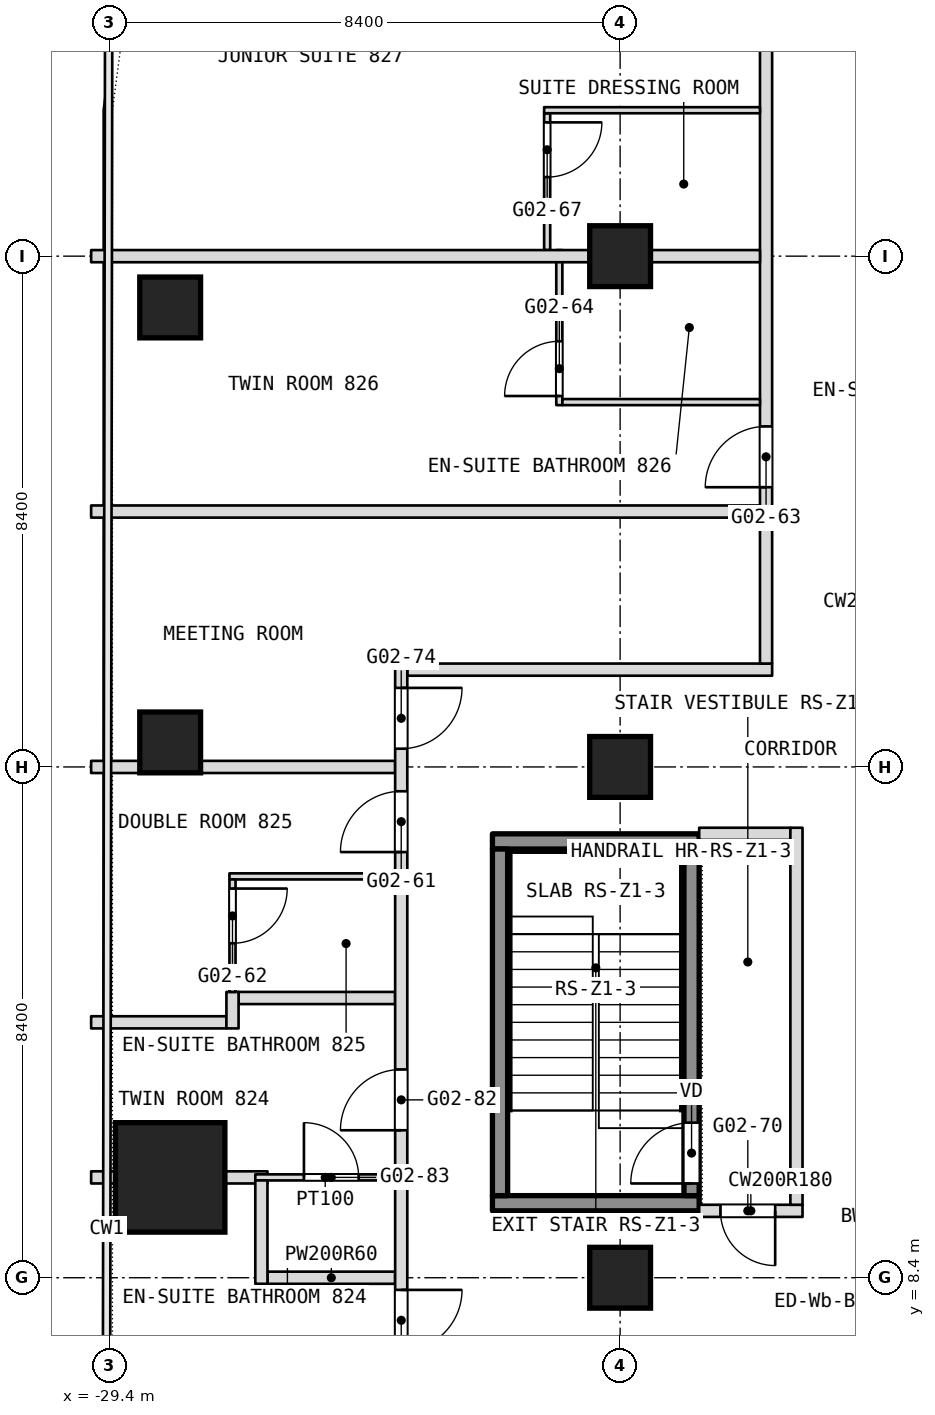
"""IFC4 building model, lengths in metres.
Left out: names, types, materials, properties, quantities, classifications, styles, units other than length and angle.
Written with IfcOpenShell. Run it as: python <this file> out.ifc"""

import sys

from ifc_helpers import new_model, si_unit, direction, frame, frame_2d, origin, origin_2d, place, context, subcontext, project, spatial, rectangle, extrude, element, fill, save


model = new_model("IFC4")
c1 = context("Model", 3, precision=1e-05, world=origin(), true_north=direction((0.0, 1.0)))
c2 = subcontext(c1, "Body", "Model", "MODEL_VIEW")
j1 = project(units=[si_unit("LENGTHUNIT", "METRE"), si_unit("PLANEANGLEUNIT", "RADIAN")], contexts=[c1])
p1 = place(None, origin())
s1 = spatial("IfcSite", under=j1, at=p1, CompositionType="ELEMENT")
p2 = place(p1, origin())
s2 = spatial("IfcBuilding", under=s1, at=p2, CompositionType="ELEMENT")
p3 = place(p2, frame((0.0, 0.0, 43.7)))
s3 = spatial("IfcBuildingStorey", under=s2, at=p3, CompositionType="ELEMENT", Elevation=43.7)
p4 = place(p3, frame((-28.4, 10.05, 0.0), z_axis=(0.0, 0.0, 1.0), x_axis=(1.0, 0.0, 0.0)))
e1 = element("IfcColumn", 1, at=p4, inside=s3, PredefinedType="COLUMN", context=c2, shape_type="SweptSolid", body=[
    extrude(rectangle(XDim=1.8, YDim=1.8, at=origin_2d()), origin(), (0.0, 0.0, 1.0), 3.6),
])
for number, where, z_axis, x_axis in (
    (2, (-21.0, 8.4, 0.0), (0.0, 0.0, 1.0), (1.0, 0.0, 0.0)),
    (3, (-21.0, 16.8, 0.0), (0.0, 0.0, 1.0), (1.0, 0.0, 0.0)),
    (4, (-21.0, 25.2, 0.0), (0.0, 0.0, 1.0), (1.0, 0.0, 0.0)),
    (5, (-28.4, 17.203, 0.0), (0.0, 0.0, 1.0), (1.0, 0.0, 0.0)),
    (6, (-28.4, 24.356, 0.0), (0.0, 0.0, 1.0), (1.0, 0.0, 0.0)),
):
    element("IfcColumn", number, at=place(p3, frame(where, z_axis=z_axis, x_axis=x_axis)), inside=s3, PredefinedType="COLUMN", context=c2, shape_type="SweptSolid", body=[
        extrude(rectangle(XDim=1.0, YDim=1.0, at=origin_2d()), origin(), (0.0, 0.0, 1.0), 3.6),
    ])
p5 = place(p3, frame((-26.8, 8.4, 0.0), z_axis=(0.0, 0.0, 1.0), x_axis=(1.0, 0.0, 0.0)))
e7 = element("IfcWall", 7, at=p5, inside=s3, PredefinedType="PARTITIONING", context=c2, shape_type="SweptSolid", body=[
    extrude(rectangle(XDim=2.1, YDim=0.2, at=frame_2d((1.05, 0.0))), origin(), (0.0, 0.0, 1.0), 2.84),
])
p6 = place(p3, frame((-19.7, 9.5, 0.0), z_axis=(0.0, 0.0, 1.0), x_axis=(1.0, 0.0, 0.0)))
e8 = element("IfcWall", 8, at=p6, inside=s3, PredefinedType="PARTITIONING", context=c2, shape_type="SweptSolid", body=[
    extrude(rectangle(XDim=1.7, YDim=0.2, at=frame_2d((0.85, 0.0))), origin(), (0.0, 0.0, 1.0), 3.34),
])
p7 = place(p6, frame((0.35, 0.0, 0.0)))
e9 = element("IfcOpeningElement", 9, at=p7, cuts=e8, PredefinedType="OPENING", context=c2, shape_type="SweptSolid", body=[
    extrude(rectangle(XDim=0.9, YDim=2.1, at=frame_2d((0.45, 1.05))), frame((0.0, 0.1, 0.0), z_axis=(0.0, -1.0, 0.0), x_axis=(1.0, 0.0, 0.0)), (0.0, 0.0, 1.0), 0.2),
])
p8 = place(p3, frame((-29.7, 10.05, 0.0), z_axis=(0.0, 0.0, 1.0), x_axis=(1.0, 0.0, 0.0)))
e10 = element("IfcWall", 10, at=p8, inside=s3, PredefinedType="PARTITIONING", context=c2, shape_type="SweptSolid", body=[
    extrude(rectangle(XDim=0.4, YDim=0.2, at=frame_2d((0.2, 0.0))), origin(), (0.0, 0.0, 1.0), 3.34),
])
p9 = place(p3, frame((-27.5, 10.05, 0.0), z_axis=(0.0, 0.0, 1.0), x_axis=(1.0, 0.0, 0.0)))
e11 = element("IfcWall", 11, at=p9, inside=s3, PredefinedType="PARTITIONING", context=c2, shape_type="SweptSolid", body=[
    extrude(rectangle(XDim=0.7, YDim=0.2, at=frame_2d((0.35, 0.0))), origin(), (0.0, 0.0, 1.0), 3.34),
])
p10 = place(p3, frame((-27.0, 10.05, 0.0), z_axis=(0.0, 0.0, 1.0), x_axis=(1.0, 0.0, 0.0)))
e12 = element("IfcWall", 12, at=p10, inside=s3, PredefinedType="PARTITIONING", context=c2, shape_type="SweptSolid", body=[
    extrude(rectangle(XDim=2.3, YDim=0.1, at=frame_2d((1.15, 0.0))), origin(), (0.0, 0.0, 1.0), 3.34),
])
p11 = place(p10, frame((0.8, 0.0, 0.0)))
e13 = element("IfcOpeningElement", 13, at=p11, cuts=e12, PredefinedType="OPENING", context=c2, shape_type="SweptSolid", body=[
    extrude(rectangle(XDim=0.9, YDim=2.1, at=frame_2d((0.45, 1.05))), frame((0.0, 0.05, 0.0), z_axis=(0.0, -1.0, 0.0), x_axis=(1.0, 0.0, 0.0)), (0.0, 0.0, 1.0), 0.1),
])
p12 = place(p3, frame((-29.7, 12.6, 0.0), z_axis=(0.0, 0.0, 1.0), x_axis=(1.0, 0.0, 0.0)))
e14 = element("IfcWall", 14, at=p12, inside=s3, PredefinedType="PARTITIONING", context=c2, shape_type="SweptSolid", body=[
    extrude(rectangle(XDim=2.225, YDim=0.2, at=frame_2d((1.112, 0.0))), origin(), (0.0, 0.0, 1.0), 3.34),
])
p13 = place(p3, frame((-27.275, 13.0, 0.0), z_axis=(0.0, 0.0, 1.0), x_axis=(1.0, 0.0, 0.0)))
e15 = element("IfcWall", 15, at=p13, inside=s3, PredefinedType="PARTITIONING", context=c2, shape_type="SweptSolid", body=[
    extrude(rectangle(XDim=2.575, YDim=0.2, at=frame_2d((1.288, 0.0))), origin(), (0.0, 0.0, 1.0), 3.34),
])
p14 = place(p3, frame((-27.425, 15.0, 0.0), z_axis=(0.0, 0.0, 1.0), x_axis=(1.0, 0.0, 0.0)))
e16 = element("IfcWall", 16, at=p14, inside=s3, PredefinedType="PARTITIONING", context=c2, shape_type="SweptSolid", body=[
    extrude(rectangle(XDim=2.725, YDim=0.1, at=frame_2d((1.363, 0.0))), origin(), (0.0, 0.0, 1.0), 3.34),
])
p15 = place(p3, frame((-19.7, 15.7, 0.0), z_axis=(0.0, 0.0, 1.0), x_axis=(1.0, 0.0, 0.0)))
e17 = element("IfcWall", 17, at=p15, inside=s3, PredefinedType="PARTITIONING", context=c2, shape_type="SweptSolid", body=[
    extrude(rectangle(XDim=1.5, YDim=0.2, at=frame_2d((0.75, 0.0))), origin(), (0.0, 0.0, 1.0), 3.34),
])
p16 = place(p3, frame((-29.7, 16.8, 0.0), z_axis=(0.0, 0.0, 1.0), x_axis=(1.0, 0.0, 0.0)))
e18 = element("IfcWall", 18, at=p16, inside=s3, PredefinedType="PARTITIONING", context=c2, shape_type="SweptSolid", body=[
    extrude(rectangle(XDim=5.0, YDim=0.2, at=frame_2d((2.5, 0.0))), origin(), (0.0, 0.0, 1.0), 2.84),
])
p17 = place(p3, frame((-18.1, 9.6, 0.0), z_axis=(0.0, 0.0, 1.0), x_axis=(0.0, 1.0, 0.0)))
e19 = element("IfcWall", 19, at=p17, inside=s3, PredefinedType="PARTITIONING", context=c2, shape_type="SweptSolid", body=[
    extrude(rectangle(XDim=6.2, YDim=0.2, at=frame_2d((3.1, 0.0))), origin(), (0.0, 0.0, 1.0), 3.34),
])
p18 = place(p3, frame((-24.5, 18.4, 0.0), z_axis=(0.0, 0.0, 1.0), x_axis=(1.0, 0.0, 0.0)))
e20 = element("IfcWall", 20, at=p18, inside=s3, PredefinedType="PARTITIONING", context=c2, shape_type="SweptSolid", body=[
    extrude(rectangle(XDim=6.0, YDim=0.2, at=frame_2d((3.0, 0.0))), origin(), (0.0, 0.0, 1.0), 3.34),
])
p19 = place(p3, frame((-18.6, 18.5, 0.0), z_axis=(0.0, 0.0, 1.0), x_axis=(0.0, 1.0, 0.0)))
e21 = element("IfcWall", 21, at=p19, inside=s3, PredefinedType="PARTITIONING", context=c2, shape_type="SweptSolid", body=[
    extrude(rectangle(XDim=15.04, YDim=0.2, at=frame_2d((7.52, 0.0))), origin(), (0.0, 0.0, 1.0), 3.34),
])
p20 = place(p19, frame((2.9, 0.0, 0.0)))
e22 = element("IfcOpeningElement", 22, at=p20, cuts=e21, PredefinedType="OPENING", context=c2, shape_type="SweptSolid", body=[
    extrude(rectangle(XDim=1.0, YDim=2.1, at=frame_2d((0.5, 1.05))), frame((0.0, 0.1, 0.0), z_axis=(0.0, -1.0, 0.0), x_axis=(1.0, 0.0, 0.0)), (0.0, 0.0, 1.0), 0.2),
])
p21 = place(p19, frame((10.3, 0.0, 0.0)))
e23 = element("IfcOpeningElement", 23, at=p21, cuts=e21, PredefinedType="OPENING", context=c2, shape_type="SweptSolid", body=[
    extrude(rectangle(XDim=1.1, YDim=2.1, at=frame_2d((0.55, 1.05))), frame((0.0, 0.1, 0.0), z_axis=(0.0, -1.0, 0.0), x_axis=(1.0, 0.0, 0.0)), (0.0, 0.0, 1.0), 0.2),
])
p22 = place(p3, frame((-29.7, 21.0, 0.0), z_axis=(0.0, 0.0, 1.0), x_axis=(1.0, 0.0, 0.0)))
e24 = element("IfcWall", 24, at=p22, inside=s3, PredefinedType="PARTITIONING", context=c2, shape_type="SweptSolid", body=[
    extrude(rectangle(XDim=11.0, YDim=0.2, at=frame_2d((5.5, 0.0))), origin(), (0.0, 0.0, 1.0), 3.34),
])
p23 = place(p3, frame((-22.0, 22.75, 0.0), z_axis=(0.0, 0.0, 1.0), x_axis=(0.0, 1.0, 0.0)))
e25 = element("IfcWall", 25, at=p23, inside=s3, PredefinedType="PARTITIONING", context=c2, shape_type="SweptSolid", body=[
    extrude(rectangle(XDim=2.55, YDim=0.1, at=frame_2d((1.275, 0.0))), origin(), (0.0, 0.0, 1.0), 3.34),
])
p24 = place(p23, frame((0.15, 0.0, 0.0)))
e26 = element("IfcOpeningElement", 26, at=p24, cuts=e25, PredefinedType="OPENING", context=c2, shape_type="SweptSolid", body=[
    extrude(rectangle(XDim=0.9, YDim=2.1, at=frame_2d((0.45, 1.05))), frame((0.0, 0.05, 0.0), z_axis=(0.0, -1.0, 0.0), x_axis=(1.0, 0.0, 0.0)), (0.0, 0.0, 1.0), 0.1),
])
p25 = place(p3, frame((-22.2, 25.3, 0.0), z_axis=(0.0, 0.0, 1.0), x_axis=(0.0, 1.0, 0.0)))
e27 = element("IfcWall", 27, at=p25, inside=s3, PredefinedType="PARTITIONING", context=c2, shape_type="SweptSolid", body=[
    extrude(rectangle(XDim=2.25, YDim=0.1, at=frame_2d((1.125, 0.0))), origin(), (0.0, 0.0, 1.0), 3.34),
])
p26 = place(p25, frame((1.2, 0.0, 0.0)))
e28 = element("IfcOpeningElement", 28, at=p26, cuts=e27, PredefinedType="OPENING", context=c2, shape_type="SweptSolid", body=[
    extrude(rectangle(XDim=0.9, YDim=2.1, at=frame_2d((0.45, 1.05))), frame((0.0, 0.05, 0.0), z_axis=(0.0, -1.0, 0.0), x_axis=(1.0, 0.0, 0.0)), (0.0, 0.0, 1.0), 0.1),
])
p27 = place(p3, frame((-21.95, 22.8, 0.0), z_axis=(0.0, 0.0, 1.0), x_axis=(1.0, 0.0, 0.0)))
e29 = element("IfcWall", 29, at=p27, inside=s3, PredefinedType="PARTITIONING", context=c2, shape_type="SweptSolid", body=[
    extrude(rectangle(XDim=3.25, YDim=0.1, at=frame_2d((1.625, 0.0))), origin(), (0.0, 0.0, 1.0), 3.34),
])
p28 = place(p3, frame((-24.6, 6.9, 0.0), z_axis=(0.0, 0.0, 1.0), x_axis=(0.0, 1.0, 0.0)))
e30 = element("IfcWall", 30, at=p28, inside=s3, PredefinedType="PARTITIONING", context=c2, shape_type="SweptSolid", body=[
    extrude(rectangle(XDim=11.6, YDim=0.2, at=frame_2d((5.8, 0.0))), origin(), (0.0, 0.0, 1.0), 3.34),
])
p29 = place(p28, frame((8.5, 0.0, 0.0)))
e31 = element("IfcOpeningElement", 31, at=p29, cuts=e30, PredefinedType="OPENING", context=c2, shape_type="SweptSolid", body=[
    extrude(rectangle(XDim=1.0, YDim=2.1, at=frame_2d((0.5, 1.05))), frame((0.0, 0.1, 0.0), z_axis=(0.0, -1.0, 0.0), x_axis=(1.0, 0.0, 0.0)), (0.0, 0.0, 1.0), 0.2),
])
p30 = place(p28, frame((10.2, 0.0, 0.0)))
e32 = element("IfcOpeningElement", 32, at=p30, cuts=e30, PredefinedType="OPENING", context=c2, shape_type="SweptSolid", body=[
    extrude(rectangle(XDim=1.0, YDim=2.1, at=frame_2d((0.5, 1.05))), frame((0.0, 0.1, 0.0), z_axis=(0.0, -1.0, 0.0), x_axis=(1.0, 0.0, 0.0)), (0.0, 0.0, 1.0), 0.2),
])
p31 = place(p28, frame((0.3, 0.0, 0.0)))
e33 = element("IfcOpeningElement", 33, at=p31, cuts=e30, PredefinedType="OPENING", context=c2, shape_type="SweptSolid", body=[
    extrude(rectangle(XDim=1.0, YDim=2.1, at=frame_2d((0.5, 1.05))), frame((0.0, 0.1, 0.0), z_axis=(0.0, -1.0, 0.0), x_axis=(1.0, 0.0, 0.0)), (0.0, 0.0, 1.0), 0.2),
])
p32 = place(p28, frame((3.925, 0.0, 0.0)))
e34 = element("IfcOpeningElement", 34, at=p32, cuts=e30, PredefinedType="OPENING", context=c2, shape_type="SweptSolid", body=[
    extrude(rectangle(XDim=1.0, YDim=2.1, at=frame_2d((0.5, 1.05))), frame((0.0, 0.1, 0.0), z_axis=(0.0, -1.0, 0.0), x_axis=(1.0, 0.0, 0.0)), (0.0, 0.0, 1.0), 0.2),
])
p33 = place(p3, frame((-29.7, 25.2, 0.0), z_axis=(0.0, 0.0, 1.0), x_axis=(1.0, 0.0, 0.0)))
e35 = element("IfcWall", 35, at=p33, inside=s3, PredefinedType="PARTITIONING", context=c2, shape_type="SweptSolid", body=[
    extrude(rectangle(XDim=11.0, YDim=0.2, at=frame_2d((5.5, 0.0))), origin(), (0.0, 0.0, 1.0), 2.84),
])
p34 = place(p3, frame((-26.9, 8.3, 0.0), z_axis=(0.0, 0.0, 1.0), x_axis=(0.0, 1.0, 0.0)))
e36 = element("IfcWall", 36, at=p34, inside=s3, PredefinedType="PARTITIONING", context=c2, shape_type="SweptSolid", body=[
    extrude(rectangle(XDim=1.7, YDim=0.2, at=frame_2d((0.85, 0.0))), origin(), (0.0, 0.0, 1.0), 3.34),
])
p35 = place(p3, frame((-27.375, 12.5, 0.0), z_axis=(0.0, 0.0, 1.0), x_axis=(0.0, 1.0, 0.0)))
e37 = element("IfcWall", 37, at=p35, inside=s3, PredefinedType="PARTITIONING", context=c2, shape_type="SweptSolid", body=[
    extrude(rectangle(XDim=0.6, YDim=0.2, at=frame_2d((0.3, 0.0))), origin(), (0.0, 0.0, 1.0), 3.34),
])
p36 = place(p3, frame((-27.375, 13.1, 0.0), z_axis=(0.0, 0.0, 1.0), x_axis=(0.0, 1.0, 0.0)))
e38 = element("IfcWall", 38, at=p36, inside=s3, PredefinedType="PARTITIONING", context=c2, shape_type="SweptSolid", body=[
    extrude(rectangle(XDim=1.85, YDim=0.1, at=frame_2d((0.925, 0.0))), origin(), (0.0, 0.0, 1.0), 3.34),
])
p37 = place(p36, frame((0.8, 0.0, 0.0)))
e39 = element("IfcOpeningElement", 39, at=p37, cuts=e38, PredefinedType="OPENING", context=c2, shape_type="SweptSolid", body=[
    extrude(rectangle(XDim=0.9, YDim=2.1, at=frame_2d((0.45, 1.05))), frame((0.0, 0.05, 0.0), z_axis=(0.0, -1.0, 0.0), x_axis=(1.0, 0.0, 0.0)), (0.0, 0.0, 1.0), 0.1),
])
p38 = place(p3, frame((-22.25, 27.6, 0.0), z_axis=(0.0, 0.0, 1.0), x_axis=(1.0, 0.0, 0.0)))
e40 = element("IfcWall", 40, at=p38, inside=s3, PredefinedType="PARTITIONING", context=c2, shape_type="SweptSolid", body=[
    extrude(rectangle(XDim=3.55, YDim=0.1, at=frame_2d((1.775, 0.0))), origin(), (0.0, 0.0, 1.0), 3.34),
])
for number, where, z_axis, x_axis in (
    (41, (-23.1, 9.625, 0.1), (0.0, 0.0, 1.0), (1.0, 0.0, 0.0)),
    (42, (-23.1, 15.575, 0.1), (0.0, 0.0, 1.0), (1.0, 0.0, 0.0)),
):
    element("IfcWall", number, at=place(p3, frame(where, z_axis=z_axis, x_axis=x_axis)), inside=s3, PredefinedType="SHEAR", context=c2, shape_type="SweptSolid", body=[
        extrude(rectangle(XDim=3.4, YDim=0.25, at=frame_2d((1.7, 0.0))), origin(), (0.0, 0.0, 1.0), 3.6),
    ])
p39 = place(p3, frame((-22.975, 9.75, 0.1), z_axis=(0.0, 0.0, 1.0), x_axis=(0.0, 1.0, 0.0)))
e43 = element("IfcWall", 43, at=p39, inside=s3, PredefinedType="SHEAR", context=c2, shape_type="SweptSolid", body=[
    extrude(rectangle(XDim=5.7, YDim=0.25, at=frame_2d((2.85, 0.0))), origin(), (0.0, 0.0, 1.0), 3.6),
])
p40 = place(p3, frame((-19.825, 9.75, 0.1), z_axis=(0.0, 0.0, 1.0), x_axis=(0.0, 1.0, 0.0)))
e44 = element("IfcWall", 44, at=p40, inside=s3, PredefinedType="SHEAR", context=c2, shape_type="SweptSolid", body=[
    extrude(rectangle(XDim=5.7, YDim=0.25, at=frame_2d((2.85, 0.0))), origin(), (0.0, 0.0, 1.0), 3.6),
])
p41 = place(p40, frame((0.2, 0.0, 0.0)))
e45 = element("IfcOpeningElement", 45, at=p41, cuts=e44, PredefinedType="OPENING", context=c2, shape_type="SweptSolid", body=[
    extrude(rectangle(XDim=1.0, YDim=2.1, at=frame_2d((0.5, 1.05))), frame((0.0, 0.125, 0.0), z_axis=(0.0, -1.0, 0.0), x_axis=(1.0, 0.0, 0.0)), (0.0, 0.0, 1.0), 0.25),
])
p42 = place(p7, origin())
e46 = element("IfcDoor", 46, at=p42, inside=s3, OperationType="SINGLE_SWING_RIGHT", PredefinedType="DOOR", context=c2, shape_type="SweptSolid", body=[
    extrude(rectangle(XDim=0.9, YDim=2.1, at=frame_2d((0.45, 1.05))), frame((0.0, 0.025, 0.0), z_axis=(0.0, -1.0, 0.0), x_axis=(1.0, 0.0, 0.0)), (0.0, 0.0, 1.0), 0.05),
])
fill(e9, e46)
p43 = place(p11, origin())
e47 = element("IfcDoor", 47, at=p43, inside=s3, OperationType="SINGLE_SWING_LEFT", PredefinedType="DOOR", context=c2, shape_type="SweptSolid", body=[
    extrude(rectangle(XDim=0.9, YDim=2.1, at=frame_2d((0.45, 1.05))), frame((0.0, 0.025, 0.0), z_axis=(0.0, -1.0, 0.0), x_axis=(1.0, 0.0, 0.0)), (0.0, 0.0, 1.0), 0.05),
])
fill(e13, e47)
p44 = place(p20, origin())
e48 = element("IfcDoor", 48, at=p44, inside=s3, OperationType="SINGLE_SWING_RIGHT", PredefinedType="DOOR", context=c2, shape_type="SweptSolid", body=[
    extrude(rectangle(XDim=1.0, YDim=2.1, at=frame_2d((0.5, 1.05))), frame((0.0, 0.025, 0.0), z_axis=(0.0, -1.0, 0.0), x_axis=(1.0, 0.0, 0.0)), (0.0, 0.0, 1.0), 0.05),
])
fill(e22, e48)
p45 = place(p24, origin())
e49 = element("IfcDoor", 49, at=p45, inside=s3, OperationType="SINGLE_SWING_RIGHT", PredefinedType="DOOR", context=c2, shape_type="SweptSolid", body=[
    extrude(rectangle(XDim=0.9, YDim=2.1, at=frame_2d((0.45, 1.05))), frame((0.0, 0.025, 0.0), z_axis=(0.0, -1.0, 0.0), x_axis=(1.0, 0.0, 0.0)), (0.0, 0.0, 1.0), 0.05),
])
fill(e26, e49)
p46 = place(p26, origin())
e50 = element("IfcDoor", 50, at=p46, inside=s3, OperationType="SINGLE_SWING_LEFT", PredefinedType="DOOR", context=c2, shape_type="SweptSolid", body=[
    extrude(rectangle(XDim=0.9, YDim=2.1, at=frame_2d((0.45, 1.05))), frame((0.0, 0.025, 0.0), z_axis=(0.0, -1.0, 0.0), x_axis=(1.0, 0.0, 0.0)), (0.0, 0.0, 1.0), 0.05),
])
fill(e28, e50)
p47 = place(p29, origin())
e51 = element("IfcDoor", 51, at=p47, inside=s3, OperationType="SINGLE_SWING_RIGHT", PredefinedType="DOOR", context=c2, shape_type="SweptSolid", body=[
    extrude(rectangle(XDim=1.0, YDim=2.1, at=frame_2d((0.5, 1.05))), frame((0.0, 0.025, 0.0), z_axis=(0.0, -1.0, 0.0), x_axis=(1.0, 0.0, 0.0)), (0.0, 0.0, 1.0), 0.05),
])
fill(e31, e51)
p48 = place(p30, origin())
e52 = element("IfcDoor", 52, at=p48, inside=s3, OperationType="SINGLE_SWING_RIGHT", PredefinedType="DOOR", context=c2, shape_type="SweptSolid", body=[
    extrude(rectangle(XDim=1.0, YDim=2.1, at=frame_2d((0.5, 1.05))), frame((0.0, 0.025, 0.0), z_axis=(0.0, -1.0, 0.0), x_axis=(1.0, 0.0, 0.0)), (0.0, 0.0, 1.0), 0.05),
])
fill(e32, e52)
p49 = place(p31, origin())
e53 = element("IfcDoor", 53, at=p49, inside=s3, OperationType="SINGLE_SWING_LEFT", PredefinedType="DOOR", context=c2, shape_type="SweptSolid", body=[
    extrude(rectangle(XDim=1.0, YDim=2.1, at=frame_2d((0.5, 1.05))), frame((0.0, 0.025, 0.0), z_axis=(0.0, -1.0, 0.0), x_axis=(1.0, 0.0, 0.0)), (0.0, 0.0, 1.0), 0.05),
])
fill(e33, e53)
p50 = place(p32, origin())
e54 = element("IfcDoor", 54, at=p50, inside=s3, OperationType="SINGLE_SWING_LEFT", PredefinedType="DOOR", context=c2, shape_type="SweptSolid", body=[
    extrude(rectangle(XDim=1.0, YDim=2.1, at=frame_2d((0.5, 1.05))), frame((0.0, 0.025, 0.0), z_axis=(0.0, -1.0, 0.0), x_axis=(1.0, 0.0, 0.0)), (0.0, 0.0, 1.0), 0.05),
])
fill(e34, e54)
p51 = place(p37, origin())
e55 = element("IfcDoor", 55, at=p51, inside=s3, OperationType="SINGLE_SWING_LEFT", PredefinedType="DOOR", context=c2, shape_type="SweptSolid", body=[
    extrude(rectangle(XDim=0.9, YDim=2.1, at=frame_2d((0.45, 1.05))), frame((0.0, 0.025, 0.0), z_axis=(0.0, -1.0, 0.0), x_axis=(1.0, 0.0, 0.0)), (0.0, 0.0, 1.0), 0.05),
])
fill(e39, e55)
p52 = place(p41, origin())
e56 = element("IfcDoor", 56, at=p52, inside=s3, OperationType="SINGLE_SWING_LEFT", PredefinedType="DOOR", context=c2, shape_type="SweptSolid", body=[
    extrude(rectangle(XDim=1.0, YDim=2.1, at=frame_2d((0.5, 1.05))), frame((0.0, 0.025, 0.0), z_axis=(0.0, -1.0, 0.0), x_axis=(1.0, 0.0, 0.0)), (0.0, 0.0, 1.0), 0.05),
])
fill(e45, e56)
save(model, sys.argv[1])
